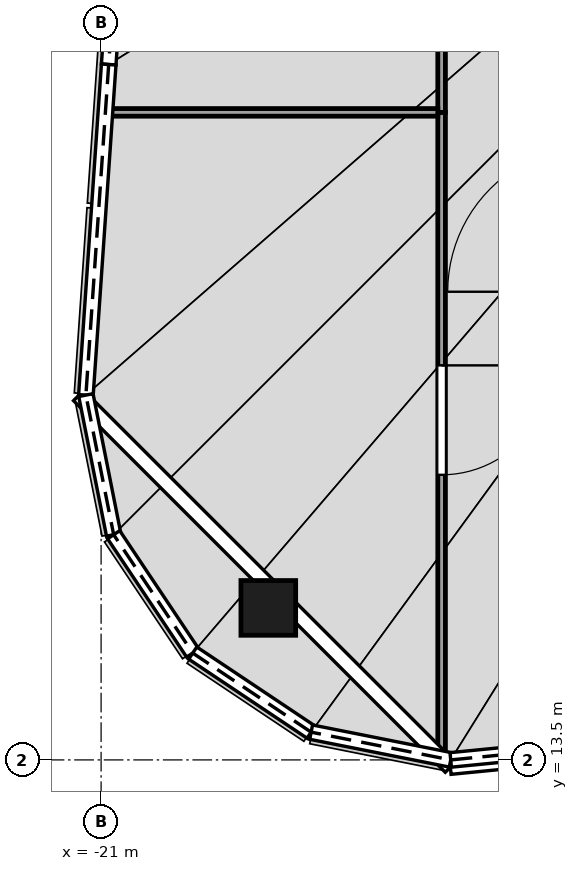
"""IFC4 building model, lengths in metres.
Left out: names, types, materials, properties, quantities, classifications, styles, units other than length and angle.
Written with IfcOpenShell. Run it as: python <this file> out.ifc"""

import sys

from ifc_helpers import new_model, si_unit, direction, frame, frame_2d, origin, origin_2d, place, context, subcontext, project, spatial, rectangle, hollow_rectangle, extrude, element, fill, save


model = new_model("IFC4")
c1 = context("Model", 3, precision=1e-05, world=origin(), true_north=direction((0.0, 1.0)))
c2 = subcontext(c1, "Body", "Model", "MODEL_VIEW")
j1 = project(units=[si_unit("LENGTHUNIT", "METRE"), si_unit("PLANEANGLEUNIT", "RADIAN")], contexts=[c1])
p1 = place(None, origin())
s1 = spatial("IfcSite", under=j1, at=p1, CompositionType="ELEMENT")
p2 = place(p1, origin())
s2 = spatial("IfcBuilding", under=s1, at=p2, CompositionType="ELEMENT")
p3 = place(p2, frame((0.0, 0.0, 368.0)))
s3 = spatial("IfcBuildingStorey", under=s2, at=p3, CompositionType="ELEMENT", Elevation=368.0)
p4 = place(p3, frame((-18.25, 16.0, 0.0), z_axis=(0.0, 0.0, 1.0), x_axis=(1.0, 0.0, 0.0)))
e1 = element("IfcColumn", 1, at=p4, inside=s3, PredefinedType="COLUMN", context=c2, shape_type="SweptSolid", body=[
    extrude(hollow_rectangle(XDim=0.9, YDim=0.9, WallThickness=0.04, at=origin_2d()), origin(), (0.0, 0.0, 1.0), 3.3),
])
p5 = place(p3, frame((-15.4, 24.15, 0.0), z_axis=(0.0, 0.0, 1.0), x_axis=(0.0, -1.0, 0.0)))
e2 = element("IfcWall", 2, at=p5, inside=s3, PredefinedType="PARTITIONING", context=c2, shape_type="SweptSolid", body=[
    extrude(rectangle(XDim=10.7, YDim=0.125, at=frame_2d((5.35, 0.0))), origin(), (0.0, 0.0, 1.0), 2.262),
])
p6 = place(p5, frame((4.161, 0.0, 0.0)))
e3 = element("IfcOpeningElement", 3, at=p6, cuts=e2, PredefinedType="OPENING", context=c2, shape_type="SweptSolid", body=[
    extrude(rectangle(XDim=1.8, YDim=2.4, at=frame_2d((0.9, 1.2))), frame((0.0, 0.073, 0.0), z_axis=(0.0, -1.0, 0.0), x_axis=(1.0, 0.0, 0.0)), (0.0, 0.0, 1.0), 0.145),
])
p7 = place(p3, frame((-15.4, 34.3, 0.0), z_axis=(0.0, 0.0, 1.0), x_axis=(0.0, -1.0, 0.0)))
e4 = element("IfcWall", 4, at=p7, inside=s3, PredefinedType="PARTITIONING", context=c2, shape_type="SweptSolid", body=[
    extrude(rectangle(XDim=10.15, YDim=0.125, at=frame_2d((5.075, 0.0))), origin(), (0.0, 0.0, 1.0), 2.97),
])
p8 = place(p7, frame((2.25, 0.0, 0.0)))
e5 = element("IfcOpeningElement", 5, at=p8, cuts=e4, PredefinedType="OPENING", context=c2, shape_type="SweptSolid", body=[
    extrude(rectangle(XDim=1.0, YDim=2.1, at=frame_2d((0.5, 1.05))), frame((0.0, 0.073, 0.0), z_axis=(0.0, -1.0, 0.0), x_axis=(1.0, 0.0, 0.0)), (0.0, 0.0, 1.0), 0.145),
])
p9 = place(p3, frame((-21.009, 24.15, 0.0), z_axis=(0.0, 0.0, 1.0), x_axis=(1.0, 0.0, 0.0)))
e6 = element("IfcWall", 6, at=p9, inside=s3, PredefinedType="PARTITIONING", context=c2, shape_type="SweptSolid", body=[
    extrude(rectangle(XDim=5.547, YDim=0.125, at=frame_2d((2.773, 0.0))), origin(), (0.0, 0.0, 1.0), 2.47),
])
p10 = place(p6, origin())
e7 = element("IfcDoor", 7, at=p10, inside=s3, OperationType="DOUBLE_DOOR_SINGLE_SWING", PredefinedType="DOOR", context=c2, shape_type="SweptSolid", body=[
    extrude(rectangle(XDim=1.8, YDim=2.4, at=frame_2d((0.9, 1.2))), frame((0.0, 0.025, 0.0), z_axis=(0.0, -1.0, 0.0), x_axis=(1.0, 0.0, 0.0)), (0.0, 0.0, 1.0), 0.05),
])
fill(e3, e7)
save(model, sys.argv[1])
